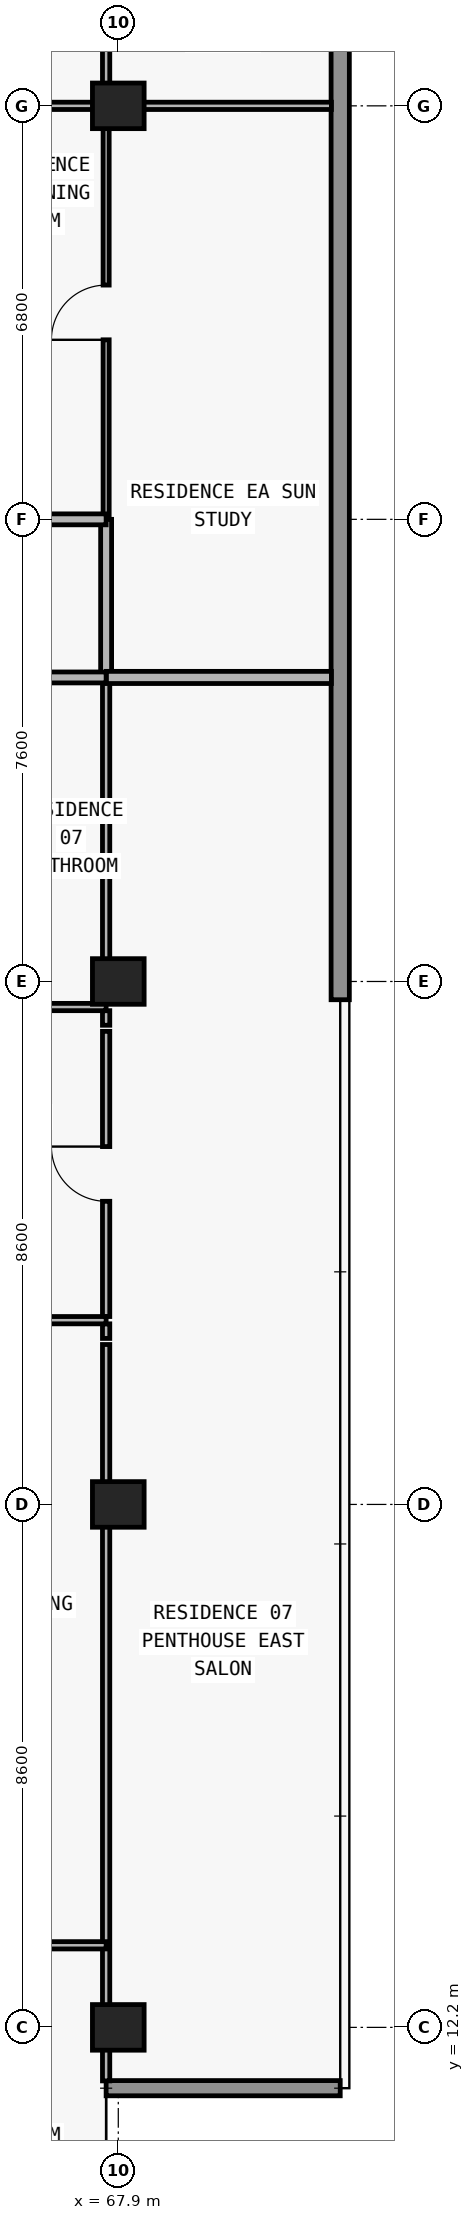
"""IFC4 building model, lengths in metres.
Left out: names, types, materials, properties, quantities, classifications, styles, units other than length and angle.
Written with IfcOpenShell. Run it as: python <this file> out.ifc"""

import sys

from ifc_helpers import new_model, si_unit, direction, frame, frame_2d, origin, origin_2d, place, context, subcontext, project, spatial, rectangle, extrude, element, fill, save


model = new_model("IFC4")
c1 = context("Model", 3, precision=1e-05, world=origin(), true_north=direction((0.0, 1.0)))
c2 = subcontext(c1, "Body", "Model", "MODEL_VIEW")
j1 = project(units=[si_unit("LENGTHUNIT", "METRE"), si_unit("PLANEANGLEUNIT", "RADIAN")], contexts=[c1])
p1 = place(None, origin())
s1 = spatial("IfcSite", under=j1, at=p1, CompositionType="ELEMENT")
p2 = place(p1, origin())
s2 = spatial("IfcBuilding", under=s1, at=p2, CompositionType="ELEMENT")
p3 = place(p2, frame((0.0, 0.0, 214.8)))
s3 = spatial("IfcBuildingStorey", under=s2, at=p3, CompositionType="ELEMENT", Elevation=214.8)
for number, where, z_axis, x_axis in (
    (1, (67.9, 12.2, 0.0), (0.0, 0.0, 1.0), (1.0, 0.0, 0.0)),
    (2, (67.9, 20.8, 0.0), (0.0, 0.0, 1.0), (1.0, 0.0, 0.0)),
    (3, (67.9, 29.4, 0.0), (0.0, 0.0, 1.0), (1.0, 0.0, 0.0)),
    (4, (67.9, 43.8, 0.0), (0.0, 0.0, 1.0), (1.0, 0.0, 0.0)),
):
    element("IfcColumn", number, at=place(p3, frame(where, z_axis=z_axis, x_axis=x_axis)), inside=s3, PredefinedType="COLUMN", context=c2, shape_type="SweptSolid", body=[
        extrude(rectangle(XDim=0.85, YDim=0.75, at=origin_2d()), origin(), (0.0, 0.0, 1.0), 3.05),
    ])
p4 = place(p3, frame((67.7, 11.2, 0.0), z_axis=(0.0, 0.0, 1.0), x_axis=(1.0, 0.0, 0.0)))
e5 = element("IfcWall", 5, at=p4, inside=s3, PredefinedType="ELEMENTEDWALL", context=c2, shape_type="SweptSolid", body=[
    extrude(rectangle(XDim=3.85, YDim=0.25, at=frame_2d((1.925, 0.0))), origin(), (0.0, 0.0, 1.0), 3.05),
])
p5 = place(p3, frame((71.55, 47.0, 0.0), z_axis=(0.0, 0.0, 1.0), x_axis=(0.0, -1.0, 0.0)))
e6 = element("IfcWall", 6, at=p5, inside=s3, PredefinedType="STANDARD", context=c2, shape_type="SweptSolid", body=[
    extrude(rectangle(XDim=17.9, YDim=0.3, at=frame_2d((8.95, 0.0))), origin(), (0.0, 0.0, 1.0), 3.05),
])
p6 = place(p3, frame((67.7, 11.32, 0.0), z_axis=(0.0, 0.0, 1.0), x_axis=(0.0, 1.0, 0.0)))
e7 = element("IfcWall", 7, at=p6, inside=s3, PredefinedType="PARTITIONING", context=c2, shape_type="SweptSolid", body=[
    extrude(rectangle(XDim=12.11, YDim=0.12, at=frame_2d((6.055, 0.0))), origin(), (0.0, 0.0, 1.0), 2.263),
])
p7 = place(p3, frame((67.7, 23.53, 0.0), z_axis=(0.0, 0.0, 1.0), x_axis=(0.0, 1.0, 0.0)))
e8 = element("IfcWall", 8, at=p7, inside=s3, PredefinedType="PARTITIONING", context=c2, shape_type="SweptSolid", body=[
    extrude(rectangle(XDim=0.24, YDim=0.12, at=frame_2d((0.12, 0.0))), origin(), (0.0, 0.0, 1.0), 2.263),
])
p8 = place(p3, frame((67.7, 23.89, 0.0), z_axis=(0.0, 0.0, 1.0), x_axis=(0.0, 1.0, 0.0)))
e9 = element("IfcWall", 9, at=p8, inside=s3, PredefinedType="PARTITIONING", context=c2, shape_type="SweptSolid", body=[
    extrude(rectangle(XDim=4.69, YDim=0.12, at=frame_2d((2.345, 0.0))), origin(), (0.0, 0.0, 1.0), 2.263),
])
p9 = place(p8, frame((1.895, 0.0, 0.0)))
e10 = element("IfcOpeningElement", 10, at=p9, cuts=e9, PredefinedType="OPENING", context=c2, shape_type="SweptSolid", body=[
    extrude(rectangle(XDim=0.9, YDim=2.15, at=frame_2d((0.45, 1.075))), frame((0.0, 0.07, 0.0), z_axis=(0.0, -1.0, 0.0), x_axis=(1.0, 0.0, 0.0)), (0.0, 0.0, 1.0), 0.14),
])
p10 = place(p3, frame((67.7, 28.68, 0.0), z_axis=(0.0, 0.0, 1.0), x_axis=(0.0, 1.0, 0.0)))
e11 = element("IfcWall", 11, at=p10, inside=s3, PredefinedType="PARTITIONING", context=c2, shape_type="SweptSolid", body=[
    extrude(rectangle(XDim=0.24, YDim=0.12, at=frame_2d((0.12, 0.0))), origin(), (0.0, 0.0, 1.0), 2.263),
])
p11 = place(p3, frame((67.7, 29.1, 0.0), z_axis=(0.0, 0.0, 1.0), x_axis=(0.0, 1.0, 0.0)))
e12 = element("IfcWall", 12, at=p11, inside=s3, PredefinedType="PARTITIONING", context=c2, shape_type="SweptSolid", body=[
    extrude(rectangle(XDim=5.3, YDim=0.12, at=frame_2d((2.65, 0.0))), origin(), (0.0, 0.0, 1.0), 2.263),
])
p12 = place(p3, frame((67.7, 34.405, 0.0), z_axis=(0.0, 0.0, 1.0), x_axis=(0.0, 1.0, 0.0)))
e13 = element("IfcWall", 13, at=p12, inside=s3, PredefinedType="PARTITIONING", context=c2, shape_type="SweptSolid", body=[
    extrude(rectangle(XDim=2.595, YDim=0.18, at=frame_2d((1.297, 0.0))), origin(), (0.0, 0.0, 1.0), 2.263),
])
p13 = place(p3, frame((67.7, 37.005, 0.0), z_axis=(0.0, 0.0, 1.0), x_axis=(0.0, 1.0, 0.0)))
e14 = element("IfcWall", 14, at=p13, inside=s3, PredefinedType="MOVABLE", context=c2, shape_type="SweptSolid", body=[
    extrude(rectangle(XDim=6.795, YDim=0.1, at=frame_2d((3.397, 0.0))), origin(), (0.0, 0.0, 1.0), 2.263),
])
p14 = place(p13, frame((2.948, 0.0, 0.0)))
e15 = element("IfcOpeningElement", 15, at=p14, cuts=e14, PredefinedType="OPENING", context=c2, shape_type="SweptSolid", body=[
    extrude(rectangle(XDim=0.9, YDim=2.15, at=frame_2d((0.45, 1.075))), frame((0.0, 0.06, 0.0), z_axis=(0.0, -1.0, 0.0), x_axis=(1.0, 0.0, 0.0)), (0.0, 0.0, 1.0), 0.12),
])
p15 = place(p3, frame((67.7, 43.805, 0.0), z_axis=(0.0, 0.0, 1.0), x_axis=(0.0, 1.0, 0.0)))
e16 = element("IfcWall", 16, at=p15, inside=s3, PredefinedType="PARTITIONING", context=c2, shape_type="SweptSolid", body=[
    extrude(rectangle(XDim=3.075, YDim=0.12, at=frame_2d((1.538, 0.0))), origin(), (0.0, 0.0, 1.0), 3.05),
])
p16 = place(p15, frame((1.087, 0.0, 0.0)))
e17 = element("IfcOpeningElement", 17, at=p16, cuts=e16, PredefinedType="OPENING", context=c2, shape_type="SweptSolid", body=[
    extrude(rectangle(XDim=0.9, YDim=2.15, at=frame_2d((0.45, 1.075))), frame((0.0, 0.07, 0.0), z_axis=(0.0, -1.0, 0.0), x_axis=(1.0, 0.0, 0.0)), (0.0, 0.0, 1.0), 0.14),
])
p17 = place(p3, frame((63.354, 13.55, 0.0), z_axis=(0.0, 0.0, 1.0), x_axis=(1.0, 0.0, 0.0)))
e18 = element("IfcWall", 18, at=p17, inside=s3, PredefinedType="PARTITIONING", context=c2, shape_type="SweptSolid", body=[
    extrude(rectangle(XDim=4.346, YDim=0.12, at=frame_2d((2.173, 0.0))), origin(), (0.0, 0.0, 1.0), 3.05),
])
p18 = place(p17, frame((1.723, 0.0, 0.0)))
e19 = element("IfcOpeningElement", 19, at=p18, cuts=e18, PredefinedType="OPENING", context=c2, shape_type="SweptSolid", body=[
    extrude(rectangle(XDim=0.9, YDim=2.15, at=frame_2d((0.45, 1.075))), frame((0.0, 0.07, 0.0), z_axis=(0.0, -1.0, 0.0), x_axis=(1.0, 0.0, 0.0)), (0.0, 0.0, 1.0), 0.14),
])
p19 = place(p3, frame((59.5, 23.83, 0.0), z_axis=(0.0, 0.0, 1.0), x_axis=(1.0, 0.0, 0.0)))
e20 = element("IfcWall", 20, at=p19, inside=s3, PredefinedType="PARTITIONING", context=c2, shape_type="SweptSolid", body=[
    extrude(rectangle(XDim=8.2, YDim=0.12, at=frame_2d((4.1, 0.0))), origin(), (0.0, 0.0, 1.0), 3.05),
])
p20 = place(p19, frame((1.477, 0.0, 0.0)))
e21 = element("IfcOpeningElement", 21, at=p20, cuts=e20, PredefinedType="OPENING", context=c2, shape_type="SweptSolid", body=[
    extrude(rectangle(XDim=0.9, YDim=2.15, at=frame_2d((0.45, 1.075))), frame((0.0, 0.07, 0.0), z_axis=(0.0, -1.0, 0.0), x_axis=(1.0, 0.0, 0.0)), (0.0, 0.0, 1.0), 0.14),
])
p21 = place(p19, frame((5.864, 0.0, 0.0)))
e22 = element("IfcOpeningElement", 22, at=p21, cuts=e20, PredefinedType="OPENING", context=c2, shape_type="SweptSolid", body=[
    extrude(rectangle(XDim=0.9, YDim=2.15, at=frame_2d((0.45, 1.075))), frame((0.0, 0.07, 0.0), z_axis=(0.0, -1.0, 0.0), x_axis=(1.0, 0.0, 0.0)), (0.0, 0.0, 1.0), 0.14),
])
p22 = place(p3, frame((59.5, 28.98, 0.0), z_axis=(0.0, 0.0, 1.0), x_axis=(1.0, 0.0, 0.0)))
e23 = element("IfcWall", 23, at=p22, inside=s3, PredefinedType="PARTITIONING", context=c2, shape_type="SweptSolid", body=[
    extrude(rectangle(XDim=8.2, YDim=0.12, at=frame_2d((4.1, 0.0))), origin(), (0.0, 0.0, 1.0), 3.05),
])
p23 = place(p22, frame((1.764, 0.0, 0.0)))
e24 = element("IfcOpeningElement", 24, at=p23, cuts=e23, PredefinedType="OPENING", context=c2, shape_type="SweptSolid", body=[
    extrude(rectangle(XDim=0.9, YDim=2.15, at=frame_2d((0.45, 1.075))), frame((0.0, 0.07, 0.0), z_axis=(0.0, -1.0, 0.0), x_axis=(1.0, 0.0, 0.0)), (0.0, 0.0, 1.0), 0.14),
])
p24 = place(p3, frame((39.28, 34.4, 0.0), z_axis=(0.0, 0.0, 1.0), x_axis=(1.0, 0.0, 0.0)))
e25 = element("IfcWall", 25, at=p24, inside=s3, PredefinedType="PARTITIONING", context=c2, shape_type="SweptSolid", body=[
    extrude(rectangle(XDim=28.42, YDim=0.18, at=frame_2d((14.21, 0.0))), origin(), (0.0, 0.0, 1.0), 3.05),
])
p25 = place(p24, frame((6.18, 0.0, 0.0)))
e26 = element("IfcOpeningElement", 26, at=p25, cuts=e25, PredefinedType="OPENING", context=c2, shape_type="SweptSolid", body=[
    extrude(rectangle(XDim=1.0, YDim=2.2, at=frame_2d((0.5, 1.1))), frame((0.0, 0.1, 0.0), z_axis=(0.0, -1.0, 0.0), x_axis=(1.0, 0.0, 0.0)), (0.0, 0.0, 1.0), 0.2),
])
p26 = place(p24, frame((14.695, 0.0, 0.0)))
e27 = element("IfcOpeningElement", 27, at=p26, cuts=e25, PredefinedType="OPENING", context=c2, shape_type="SweptSolid", body=[
    extrude(rectangle(XDim=1.0, YDim=2.2, at=frame_2d((0.5, 1.1))), frame((0.0, 0.1, 0.0), z_axis=(0.0, -1.0, 0.0), x_axis=(1.0, 0.0, 0.0)), (0.0, 0.0, 1.0), 0.2),
])
p27 = place(p24, frame((22.87, 0.0, 0.0)))
e28 = element("IfcOpeningElement", 28, at=p27, cuts=e25, PredefinedType="OPENING", context=c2, shape_type="SweptSolid", body=[
    extrude(rectangle(XDim=1.0, YDim=2.2, at=frame_2d((0.5, 1.1))), frame((0.0, 0.1, 0.0), z_axis=(0.0, -1.0, 0.0), x_axis=(1.0, 0.0, 0.0)), (0.0, 0.0, 1.0), 0.2),
])
p28 = place(p3, frame((67.705, 34.4, 0.0), z_axis=(0.0, 0.0, 1.0), x_axis=(1.0, 0.0, 0.0)))
e29 = element("IfcWall", 29, at=p28, inside=s3, PredefinedType="PARTITIONING", context=c2, shape_type="SweptSolid", body=[
    extrude(rectangle(XDim=3.7, YDim=0.2, at=frame_2d((1.85, 0.0))), origin(), (0.0, 0.0, 1.0), 3.05),
])
p29 = place(p3, frame((59.855, 37.0, 0.0), z_axis=(0.0, 0.0, 1.0), x_axis=(1.0, 0.0, 0.0)))
e30 = element("IfcWall", 30, at=p29, inside=s3, PredefinedType="PARTITIONING", context=c2, shape_type="SweptSolid", body=[
    extrude(rectangle(XDim=7.845, YDim=0.18, at=frame_2d((3.922, 0.0))), origin(), (0.0, 0.0, 1.0), 3.05),
])
p30 = place(p29, frame((3.349, 0.0, 0.0)))
e31 = element("IfcOpeningElement", 31, at=p30, cuts=e30, PredefinedType="OPENING", context=c2, shape_type="SweptSolid", body=[
    extrude(rectangle(XDim=1.0, YDim=2.2, at=frame_2d((0.5, 1.1))), frame((0.0, 0.1, 0.0), z_axis=(0.0, -1.0, 0.0), x_axis=(1.0, 0.0, 0.0)), (0.0, 0.0, 1.0), 0.2),
])
p31 = place(p3, frame((59.845, 43.8, 0.0), z_axis=(0.0, 0.0, 1.0), x_axis=(1.0, 0.0, 0.0)))
e32 = element("IfcWall", 32, at=p31, inside=s3, PredefinedType="PARTITIONING", context=c2, shape_type="SweptSolid", body=[
    extrude(rectangle(XDim=11.56, YDim=0.12, at=frame_2d((5.78, 0.0))), origin(), (0.0, 0.0, 1.0), 2.418),
])
p32 = place(p31, frame((3.409, 0.0, 0.0)))
e33 = element("IfcOpeningElement", 33, at=p32, cuts=e32, PredefinedType="OPENING", context=c2, shape_type="SweptSolid", body=[
    extrude(rectangle(XDim=0.9, YDim=2.15, at=frame_2d((0.45, 1.075))), frame((0.0, 0.07, 0.0), z_axis=(0.0, -1.0, 0.0), x_axis=(1.0, 0.0, 0.0)), (0.0, 0.0, 1.0), 0.14),
])
p33 = place(p31, frame((0.728, 0.0, 0.0)))
e34 = element("IfcOpeningElement", 34, at=p33, cuts=e32, PredefinedType="OPENING", context=c2, shape_type="SweptSolid", body=[
    extrude(rectangle(XDim=0.85, YDim=2.1, at=frame_2d((0.425, 1.05))), frame((0.0, 0.07, 0.0), z_axis=(0.0, -1.0, 0.0), x_axis=(1.0, 0.0, 0.0)), (0.0, 0.0, 1.0), 0.14),
])
p34 = place(p9, origin())
e35 = element("IfcDoor", 35, at=p34, inside=s3, OperationType="SINGLE_SWING_RIGHT", PredefinedType="DOOR", context=c2, shape_type="SweptSolid", body=[
    extrude(rectangle(XDim=0.9, YDim=2.15, at=frame_2d((0.45, 1.075))), frame((0.0, 0.025, 0.0), z_axis=(0.0, -1.0, 0.0), x_axis=(1.0, 0.0, 0.0)), (0.0, 0.0, 1.0), 0.05),
])
fill(e10, e35)
p35 = place(p14, origin())
e36 = element("IfcDoor", 36, at=p35, inside=s3, OperationType="SINGLE_SWING_LEFT", PredefinedType="DOOR", context=c2, shape_type="SweptSolid", body=[
    extrude(rectangle(XDim=0.9, YDim=2.15, at=frame_2d((0.45, 1.075))), frame((0.0, 0.025, 0.0), z_axis=(0.0, -1.0, 0.0), x_axis=(1.0, 0.0, 0.0)), (0.0, 0.0, 1.0), 0.05),
])
fill(e15, e36)
save(model, sys.argv[1])
